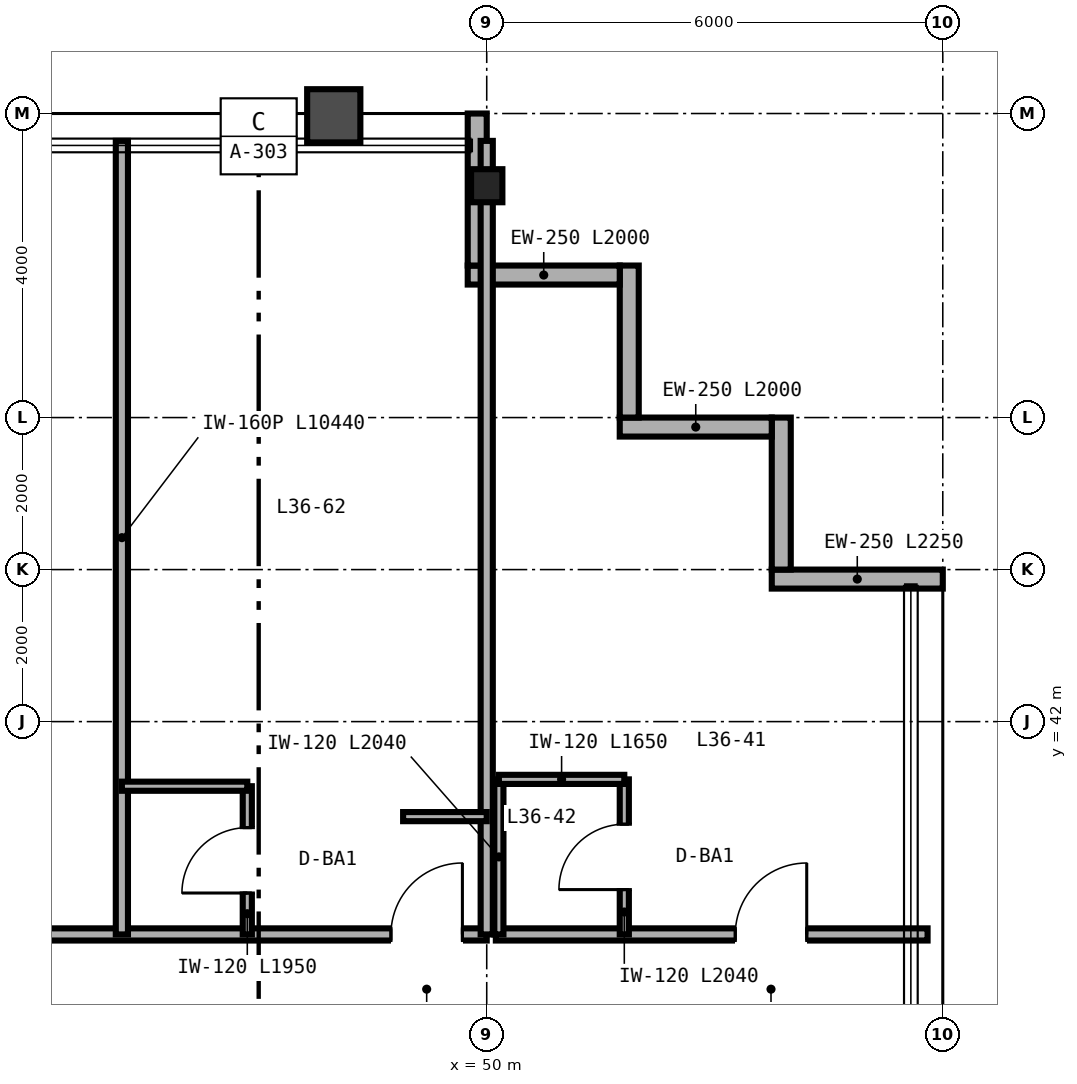
"""IFC4 building model, lengths in metres.
Left out: names, types, materials, properties, quantities, classifications, styles, units other than length and angle.
Written with IfcOpenShell. Run it as: python <this file> out.ifc"""

import sys

from ifc_helpers import new_model, si_unit, direction, frame, frame_2d, origin, origin_2d, place, context, subcontext, project, spatial, rectangle, i_section, extrude, source, transform, mapped, element, fill, save


model = new_model("IFC4")
c1 = context("Model", 3, precision=1e-05, world=origin(), true_north=direction((0.0, 1.0)))
c2 = subcontext(c1, "Body", "Model", "MODEL_VIEW")
j1 = project(units=[si_unit("LENGTHUNIT", "METRE"), si_unit("PLANEANGLEUNIT", "RADIAN")], contexts=[c1])
p1 = place(None, origin())
s1 = spatial("IfcSite", under=j1, at=p1, CompositionType="ELEMENT")
p2 = place(p1, origin())
s2 = spatial("IfcBuilding", under=s1, at=p2, CompositionType="ELEMENT")
p3 = place(p2, frame((0.0, 0.0, 144.0)))
s3 = spatial("IfcBuildingStorey", under=s2, at=p3, CompositionType="ELEMENT", Elevation=144.0)
m1 = source(origin(), c2, "Body", "SweptSolid", [
    extrude(i_section(OverallWidth=0.412, OverallDepth=0.435, WebThickness=0.036, FlangeThickness=0.057, FilletRadius=0.025, at=origin_2d()), origin(), (0.0, 0.0, 1.0), 3.36),
])
p4 = place(p3, frame((50.0, 49.05, 0.0), z_axis=(0.0, 0.0, 1.0), x_axis=(1.0, 0.0, 0.0)))
e1 = element("IfcColumn", 1, at=p4, inside=s3, PredefinedType="COLUMN", context=c2, shape_type="MappedRepresentation", body=[
    mapped(m1, transform((0.0, 0.0, 0.0), scale=1.0)),
])
p5 = place(p3, frame((56.0, 43.875, 0.0), z_axis=(0.0, 0.0, 1.0), x_axis=(-1.0, 0.0, 0.0)))
e2 = element("IfcWall", 2, at=p5, inside=s3, PredefinedType="SOLIDWALL", context=c2, shape_type="SweptSolid", body=[
    extrude(rectangle(XDim=2.25, YDim=0.25, at=frame_2d((1.125, 0.0))), origin(), (0.0, 0.0, 1.0), 3.36),
])
for number, where, z_axis, x_axis in (
    (3, (53.875, 44.0, 0.0), (0.0, 0.0, 1.0), (0.0, 1.0, 0.0)),
    (4, (53.75, 45.875, 0.0), (0.0, 0.0, 1.0), (-1.0, 0.0, 0.0)),
    (5, (51.875, 46.0, 0.0), (0.0, 0.0, 1.0), (0.0, 1.0, 0.0)),
    (6, (51.75, 47.875, 0.0), (0.0, 0.0, 1.0), (-1.0, 0.0, 0.0)),
):
    element("IfcWall", number, at=place(p3, frame(where, z_axis=z_axis, x_axis=x_axis)), inside=s3, PredefinedType="SOLIDWALL", context=c2, shape_type="SweptSolid", body=[
        extrude(rectangle(XDim=2.0, YDim=0.25, at=frame_2d((1.0, 0.0))), origin(), (0.0, 0.0, 1.0), 3.36),
    ])
p6 = place(p3, frame((49.875, 48.0, 0.0), z_axis=(0.0, 0.0, 1.0), x_axis=(0.0, 1.0, 0.0)))
e7 = element("IfcWall", 7, at=p6, inside=s3, PredefinedType="SOLIDWALL", context=c2, shape_type="SweptSolid", body=[
    extrude(rectangle(XDim=2.0, YDim=0.25, at=frame_2d((1.0, 0.0))), origin(), (0.0, 0.0, 1.0), 2.667),
])
p7 = place(p3, frame((50.12, 39.2, 0.0), z_axis=(0.0, 0.0, 1.0), x_axis=(1.0, 0.0, 0.0)))
e8 = element("IfcWall", 8, at=p7, inside=s3, PredefinedType="PARTITIONING", context=c2, shape_type="SweptSolid", body=[
    extrude(rectangle(XDim=5.68, YDim=0.16, at=frame_2d((2.84, 0.0))), origin(), (0.0, 0.0, 1.0), 3.36),
])
p8 = place(p7, frame((3.15, 0.0, 0.0)))
e9 = element("IfcOpeningElement", 9, at=p8, cuts=e8, PredefinedType="OPENING", context=c2, shape_type="SweptSolid", body=[
    extrude(rectangle(XDim=0.94, YDim=2.15, at=frame_2d((0.47, 1.075))), frame((0.0, 0.09, 0.0), z_axis=(0.0, -1.0, 0.0), x_axis=(1.0, 0.0, 0.0)), (0.0, 0.0, 1.0), 0.18),
])
p9 = place(p3, frame((51.81, 39.2, 0.0), z_axis=(0.0, 0.0, 1.0), x_axis=(0.0, 1.0, 0.0)))
e10 = element("IfcWall", 10, at=p9, inside=s3, PredefinedType="PARTITIONING", context=c2, shape_type="SweptSolid", body=[
    extrude(rectangle(XDim=2.04, YDim=0.12, at=frame_2d((1.02, 0.0))), origin(), (0.0, 0.0, 1.0), 3.36),
])
p10 = place(p9, frame((0.59, 0.0, 0.0)))
e11 = element("IfcOpeningElement", 11, at=p10, cuts=e10, PredefinedType="OPENING", context=c2, shape_type="SweptSolid", body=[
    extrude(rectangle(XDim=0.86, YDim=2.1, at=frame_2d((0.43, 1.05))), frame((0.0, 0.07, 0.0), z_axis=(0.0, -1.0, 0.0), x_axis=(1.0, 0.0, 0.0)), (0.0, 0.0, 1.0), 0.14),
])
p11 = place(p3, frame((50.16, 39.2, 0.0), z_axis=(0.0, 0.0, 1.0), x_axis=(0.0, 1.0, 0.0)))
e12 = element("IfcWall", 12, at=p11, inside=s3, PredefinedType="PARTITIONING", context=c2, shape_type="SweptSolid", body=[
    extrude(rectangle(XDim=2.04, YDim=0.12, at=frame_2d((1.02, 0.0))), origin(), (0.0, 0.0, 1.0), 3.36),
])
p12 = place(p3, frame((50.16, 41.24, 0.0), z_axis=(0.0, 0.0, 1.0), x_axis=(1.0, 0.0, 0.0)))
e13 = element("IfcWall", 13, at=p12, inside=s3, PredefinedType="PARTITIONING", context=c2, shape_type="SweptSolid", body=[
    extrude(rectangle(XDim=1.65, YDim=0.12, at=frame_2d((0.825, 0.0))), origin(), (0.0, 0.0, 1.0), 3.36),
])
p13 = place(p3, frame((14.0, 39.2, 0.0), z_axis=(0.0, 0.0, 1.0), x_axis=(1.0, 0.0, 0.0)))
e14 = element("IfcWall", 14, at=p13, inside=s3, PredefinedType="PARTITIONING", context=c2, shape_type="SweptSolid", body=[
    extrude(rectangle(XDim=36.0, YDim=0.16, at=frame_2d((18.0, 0.0))), origin(), (0.0, 0.0, 1.0), 2.581),
])
p14 = place(p13, frame((4.34, 0.0, 0.0)))
e15 = element("IfcOpeningElement", 15, at=p14, cuts=e14, PredefinedType="OPENING", context=c2, shape_type="SweptSolid", body=[
    extrude(rectangle(XDim=0.94, YDim=2.15, at=frame_2d((0.47, 1.075))), frame((0.0, 0.09, 0.0), z_axis=(0.0, -1.0, 0.0), x_axis=(1.0, 0.0, 0.0)), (0.0, 0.0, 1.0), 0.18),
])
p15 = place(p13, frame((9.94, 0.0, 0.0)))
e16 = element("IfcOpeningElement", 16, at=p15, cuts=e14, PredefinedType="OPENING", context=c2, shape_type="SweptSolid", body=[
    extrude(rectangle(XDim=0.94, YDim=2.15, at=frame_2d((0.47, 1.075))), frame((0.0, 0.09, 0.0), z_axis=(0.0, -1.0, 0.0), x_axis=(1.0, 0.0, 0.0)), (0.0, 0.0, 1.0), 0.18),
])
p16 = place(p13, frame((17.3, 0.0, 0.0)))
e17 = element("IfcOpeningElement", 17, at=p16, cuts=e14, PredefinedType="OPENING", context=c2, shape_type="SweptSolid", body=[
    extrude(rectangle(XDim=0.98, YDim=2.2, at=frame_2d((0.49, 1.1))), frame((0.0, 0.09, 0.0), z_axis=(0.0, -1.0, 0.0), x_axis=(1.0, 0.0, 0.0)), (0.0, 0.0, 1.0), 0.18),
])
p17 = place(p13, frame((24.7, 0.0, 0.0)))
e18 = element("IfcOpeningElement", 18, at=p17, cuts=e14, PredefinedType="OPENING", context=c2, shape_type="SweptSolid", body=[
    extrude(rectangle(XDim=0.98, YDim=2.2, at=frame_2d((0.49, 1.1))), frame((0.0, 0.09, 0.0), z_axis=(0.0, -1.0, 0.0), x_axis=(1.0, 0.0, 0.0)), (0.0, 0.0, 1.0), 0.18),
])
p18 = place(p13, frame((28.12, 0.0, 0.0)))
e19 = element("IfcOpeningElement", 19, at=p18, cuts=e14, PredefinedType="OPENING", context=c2, shape_type="SweptSolid", body=[
    extrude(rectangle(XDim=0.96, YDim=2.15, at=frame_2d((0.48, 1.075))), frame((0.0, 0.09, 0.0), z_axis=(0.0, -1.0, 0.0), x_axis=(1.0, 0.0, 0.0)), (0.0, 0.0, 1.0), 0.18),
])
p19 = place(p13, frame((34.74, 0.0, 0.0)))
e20 = element("IfcOpeningElement", 20, at=p19, cuts=e14, PredefinedType="OPENING", context=c2, shape_type="SweptSolid", body=[
    extrude(rectangle(XDim=0.94, YDim=2.15, at=frame_2d((0.47, 1.075))), frame((0.0, 0.09, 0.0), z_axis=(0.0, -1.0, 0.0), x_axis=(1.0, 0.0, 0.0)), (0.0, 0.0, 1.0), 0.18),
])
for number, where, z_axis, x_axis in (
    (21, (50.0, 39.2, 0.0), (0.0, 0.0, 1.0), (0.0, 1.0, 0.0)),
    (22, (45.2, 39.2, 0.0), (0.0, 0.0, 1.0), (0.0, 1.0, 0.0)),
):
    element("IfcWall", number, at=place(p3, frame(where, z_axis=z_axis, x_axis=x_axis)), inside=s3, PredefinedType="PARTITIONING", context=c2, shape_type="SweptSolid", body=[
        extrude(rectangle(XDim=10.44, YDim=0.16, at=frame_2d((5.22, 0.0))), origin(), (0.0, 0.0, 1.0), 2.667),
    ])
p20 = place(p3, frame((46.85, 39.2, 0.0), z_axis=(0.0, 0.0, 1.0), x_axis=(0.0, 1.0, 0.0)))
e23 = element("IfcWall", 23, at=p20, inside=s3, PredefinedType="PARTITIONING", context=c2, shape_type="SweptSolid", body=[
    extrude(rectangle(XDim=1.95, YDim=0.12, at=frame_2d((0.975, 0.0))), origin(), (0.0, 0.0, 1.0), 3.36),
])
p21 = place(p20, frame((0.545, 0.0, 0.0)))
e24 = element("IfcOpeningElement", 24, at=p21, cuts=e23, PredefinedType="OPENING", context=c2, shape_type="SweptSolid", body=[
    extrude(rectangle(XDim=0.86, YDim=2.1, at=frame_2d((0.43, 1.05))), frame((0.0, 0.07, 0.0), z_axis=(0.0, -1.0, 0.0), x_axis=(1.0, 0.0, 0.0)), (0.0, 0.0, 1.0), 0.14),
])
p22 = place(p3, frame((45.2, 41.15, 0.0), z_axis=(0.0, 0.0, 1.0), x_axis=(1.0, 0.0, 0.0)))
e25 = element("IfcWall", 25, at=p22, inside=s3, PredefinedType="PARTITIONING", context=c2, shape_type="SweptSolid", body=[
    extrude(rectangle(XDim=1.65, YDim=0.12, at=frame_2d((0.825, 0.0))), origin(), (0.0, 0.0, 1.0), 3.36),
])
p23 = place(p3, frame((48.9, 40.75, 0.0), z_axis=(0.0, 0.0, 1.0), x_axis=(1.0, 0.0, 0.0)))
e26 = element("IfcWall", 26, at=p23, inside=s3, PredefinedType="PARTITIONING", context=c2, shape_type="SweptSolid", body=[
    extrude(rectangle(XDim=1.1, YDim=0.12, at=frame_2d((0.55, 0.0))), origin(), (0.0, 0.0, 1.0), 3.36),
])
m2 = source(origin(), c2, "Body", "SweptSolid", [
    extrude(rectangle(XDim=0.86, YDim=2.1, at=frame_2d((0.43, 1.05))), frame((0.0, 0.025, 0.0), z_axis=(0.0, -1.0, 0.0), x_axis=(1.0, 0.0, 0.0)), (0.0, 0.0, 1.0), 0.05),
])
p24 = place(p10, origin())
e27 = element("IfcDoor", 27, at=p24, inside=s3, OperationType="SINGLE_SWING_LEFT", PredefinedType="DOOR", context=c2, shape_type="MappedRepresentation", body=[
    mapped(m2, transform((0.0, 0.0, 0.0), scale=1.0)),
])
fill(e11, e27)
m3 = source(origin(), c2, "Body", "SweptSolid", [
    extrude(rectangle(XDim=0.94, YDim=2.15, at=frame_2d((0.47, 1.075))), frame((0.0, 0.025, 0.0), z_axis=(0.0, -1.0, 0.0), x_axis=(1.0, 0.0, 0.0)), (0.0, 0.0, 1.0), 0.05),
])
p25 = place(p8, origin())
e28 = element("IfcDoor", 28, at=p25, inside=s3, OperationType="SINGLE_SWING_RIGHT", PredefinedType="DOOR", context=c2, shape_type="MappedRepresentation", body=[
    mapped(m3, transform((0.0, 0.0, 0.0), scale=1.0)),
])
fill(e9, e28)
p26 = place(p21, origin())
e29 = element("IfcDoor", 29, at=p26, inside=s3, OperationType="SINGLE_SWING_LEFT", PredefinedType="DOOR", context=c2, shape_type="MappedRepresentation", body=[
    mapped(m2, transform((0.0, 0.0, 0.0), scale=1.0)),
])
fill(e24, e29)
p27 = place(p19, origin())
e30 = element("IfcDoor", 30, at=p27, inside=s3, OperationType="SINGLE_SWING_RIGHT", PredefinedType="DOOR", context=c2, shape_type="MappedRepresentation", body=[
    mapped(m3, transform((0.0, 0.0, 0.0), scale=1.0)),
])
fill(e20, e30)
save(model, sys.argv[1])
